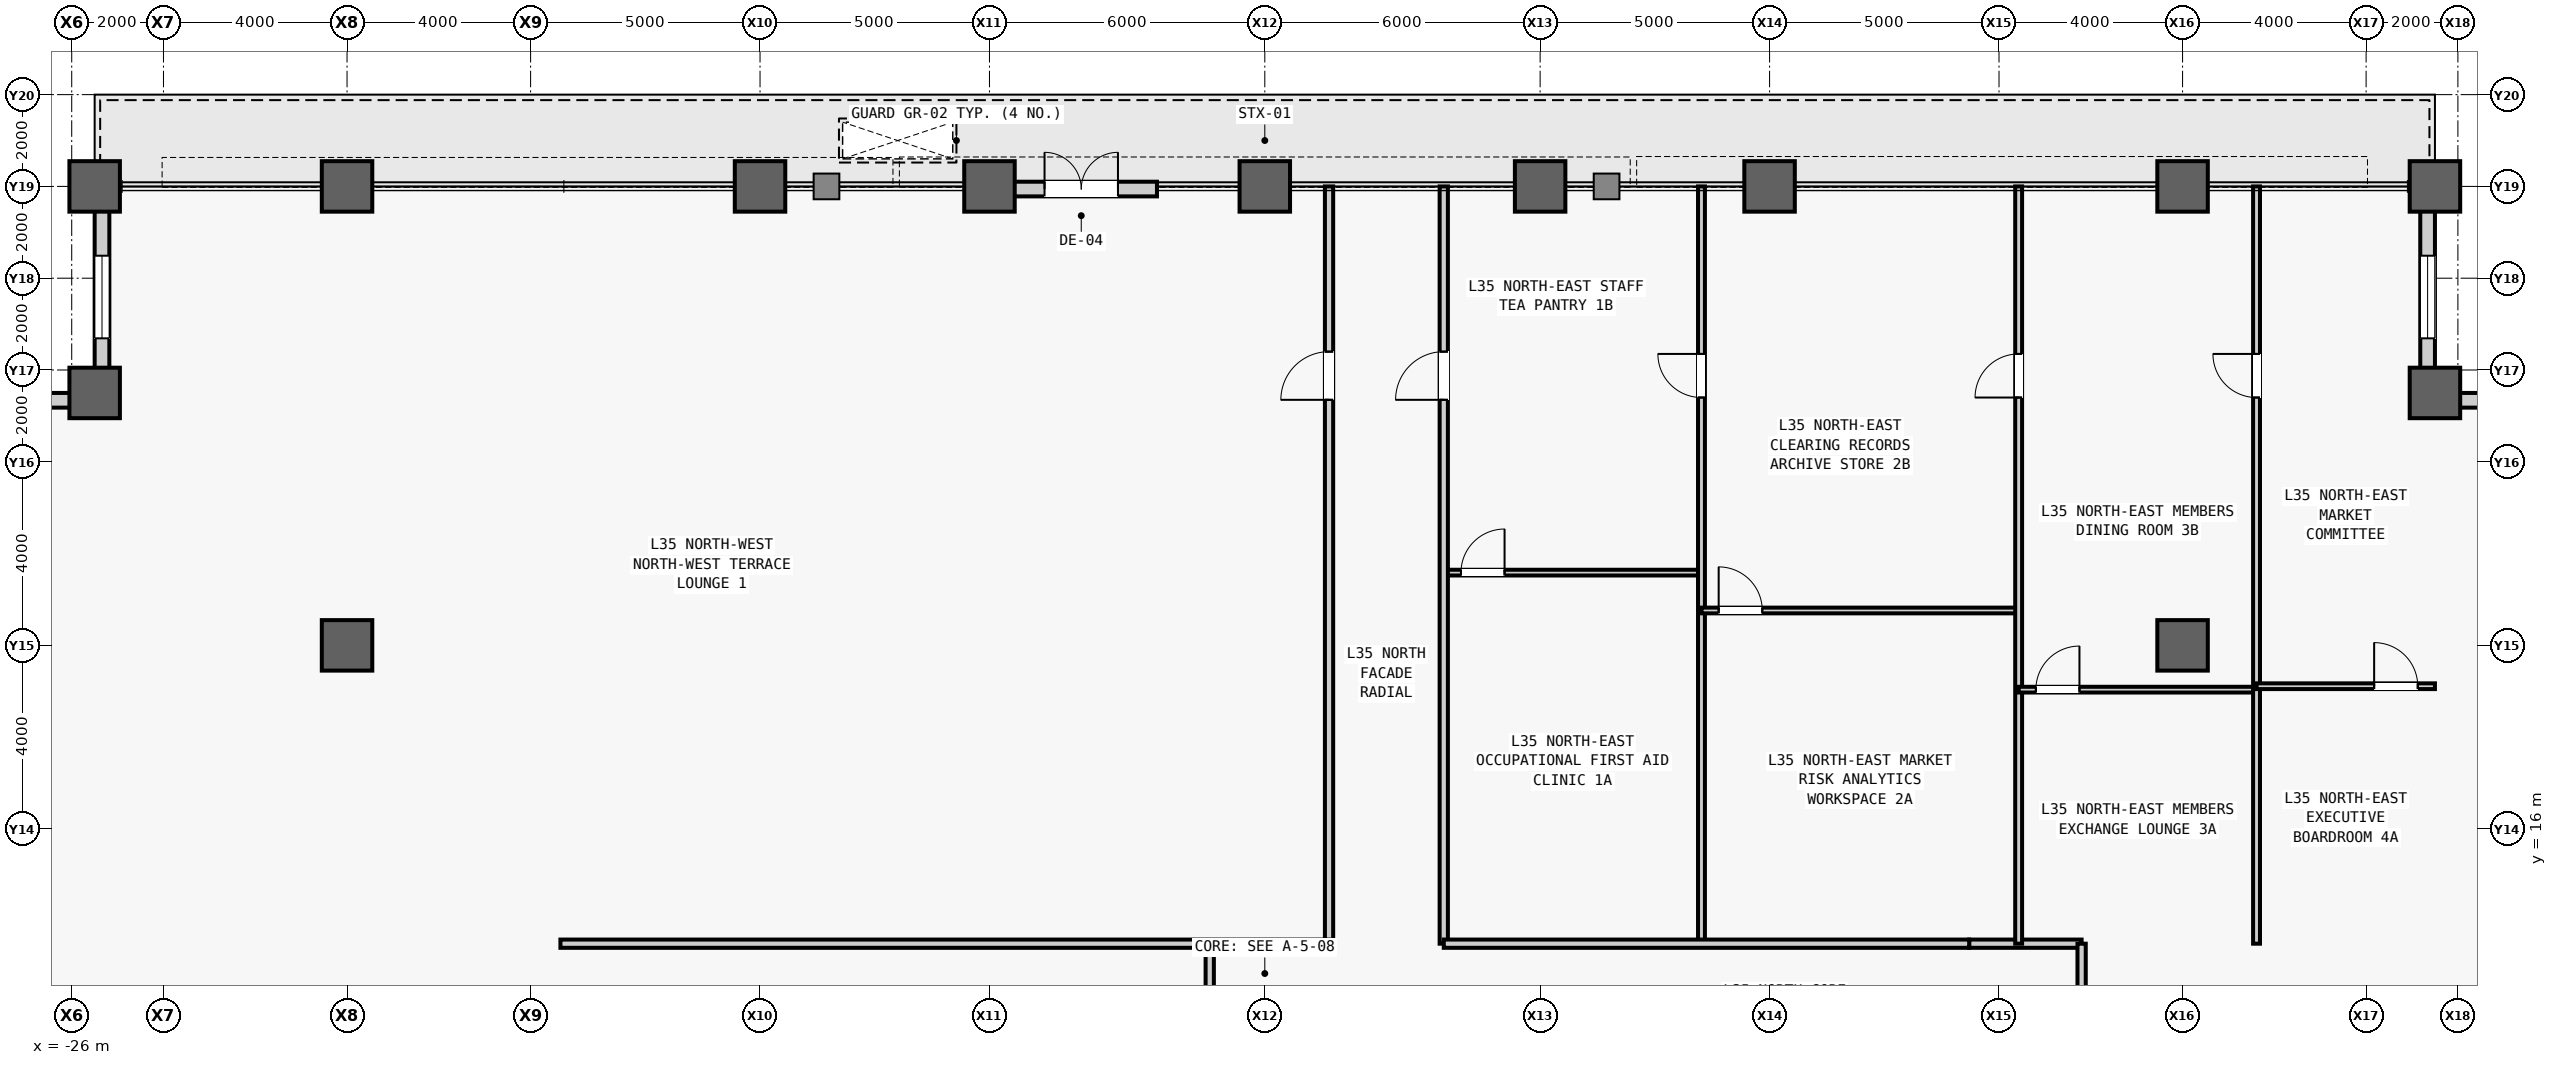
"""IFC4 building model, lengths in metres.
Left out: names, types, materials, properties, quantities, classifications, styles, units other than length and angle.
Written with IfcOpenShell. Run it as: python <this file> out.ifc"""

import sys

from ifc_helpers import new_model, si_unit, direction, frame, frame_2d, origin, origin_2d, place, context, subcontext, project, spatial, rectangle, hollow_rectangle, extrude, source, transform, mapped, element, fill, save


model = new_model("IFC4")
c1 = context("Model", 3, precision=1e-05, world=origin(), true_north=direction((0.0, 1.0)))
c2 = subcontext(c1, "Body", "Model", "MODEL_VIEW")
j1 = project(units=[si_unit("LENGTHUNIT", "METRE"), si_unit("PLANEANGLEUNIT", "RADIAN")], contexts=[c1])
p1 = place(None, origin())
s1 = spatial("IfcSite", under=j1, at=p1, CompositionType="ELEMENT")
p2 = place(p1, origin())
s2 = spatial("IfcBuilding", under=s1, at=p2, CompositionType="ELEMENT")
p3 = place(p2, frame((0.0, 0.0, 155.1)))
s3 = spatial("IfcBuildingStorey", under=s2, at=p3, CompositionType="ELEMENT", Elevation=155.1)
m1 = source(origin(), c2, "Body", "SweptSolid", [
    extrude(hollow_rectangle(XDim=1.1, YDim=1.1, WallThickness=0.06, at=origin_2d()), origin(), (0.0, 0.0, 1.0), 4.0),
])
for number, where, z_axis, x_axis in (
    (1, (-25.5, 25.5, 0.0), (0.0, 0.0, 1.0), (1.0, 0.0, 0.0)),
    (2, (-25.5, 30.0, 0.0), (0.0, 0.0, 1.0), (1.0, 0.0, 0.0)),
    (3, (-20.0, 20.0, 0.0), (0.0, 0.0, 1.0), (1.0, 0.0, 0.0)),
    (4, (-20.0, 30.0, 0.0), (0.0, 0.0, 1.0), (1.0, 0.0, 0.0)),
    (5, (-11.0, 30.0, 0.0), (0.0, 0.0, 1.0), (1.0, 0.0, 0.0)),
    (6, (-6.0, 30.0, 0.0), (0.0, 0.0, 1.0), (1.0, 0.0, 0.0)),
    (7, (0.0, 30.0, 0.0), (0.0, 0.0, 1.0), (1.0, 0.0, 0.0)),
    (8, (6.0, 30.0, 0.0), (0.0, 0.0, 1.0), (1.0, 0.0, 0.0)),
    (9, (11.0, 30.0, 0.0), (0.0, 0.0, 1.0), (1.0, 0.0, 0.0)),
    (10, (20.0, 20.0, 0.0), (0.0, 0.0, 1.0), (1.0, 0.0, 0.0)),
    (11, (20.0, 30.0, 0.0), (0.0, 0.0, 1.0), (1.0, 0.0, 0.0)),
    (12, (25.5, 25.5, 0.0), (0.0, 0.0, 1.0), (1.0, 0.0, 0.0)),
    (13, (25.5, 30.0, 0.0), (0.0, 0.0, 1.0), (1.0, 0.0, 0.0)),
):
    element("IfcColumn", number, at=place(p3, frame(where, z_axis=z_axis, x_axis=x_axis)), inside=s3, PredefinedType="COLUMN", context=c2, shape_type="MappedRepresentation", body=[
        mapped(m1, transform((0.0, 0.0, 0.0), scale=1.0)),
    ])
m2 = source(origin(), c2, "Body", "SweptSolid", [
    extrude(rectangle(XDim=4.18, YDim=0.32, at=frame_2d((2.09, 0.0))), origin(), (0.0, 0.0, 1.0), 3.164),
])
p4 = place(p3, frame((25.5, 25.34, 0.0), z_axis=(0.0, 0.0, 1.0), x_axis=(1.0, 0.0, 0.0)))
e14 = element("IfcWall", 14, at=p4, inside=s3, PredefinedType="STANDARD", context=c2, shape_type="MappedRepresentation", body=[
    mapped(m2, transform((0.0, 0.0, 0.0), scale=1.0)),
])
m3 = source(origin(), c2, "Body", "SweptSolid", [
    extrude(rectangle(XDim=1.8, YDim=2.4, at=frame_2d((0.9, 1.2))), frame((0.0, 0.17, 0.0), z_axis=(0.0, -1.0, 0.0), x_axis=(1.0, 0.0, 0.0)), (0.0, 0.0, 1.0), 0.34),
])
p5 = place(p4, frame((1.19, 0.0, 0.5)))
e15 = element("IfcOpeningElement", 15, at=p5, cuts=e14, PredefinedType="OPENING", context=c2, shape_type="MappedRepresentation", body=[
    mapped(m3, transform((0.0, 0.0, 0.0), scale=1.0)),
])
p6 = place(p3, frame((25.34, 25.5, 0.0), z_axis=(0.0, 0.0, 1.0), x_axis=(0.0, 1.0, 0.0)))
e16 = element("IfcWall", 16, at=p6, inside=s3, PredefinedType="STANDARD", context=c2, shape_type="MappedRepresentation", body=[
    mapped(m2, transform((0.0, 0.0, 0.0), scale=1.0)),
])
p7 = place(p6, frame((1.19, 0.0, 0.5)))
e17 = element("IfcOpeningElement", 17, at=p7, cuts=e16, PredefinedType="OPENING", context=c2, shape_type="MappedRepresentation", body=[
    mapped(m3, transform((0.0, 0.0, 0.0), scale=1.0)),
])
p8 = place(p3, frame((-25.34, 25.5, 0.0), z_axis=(0.0, 0.0, 1.0), x_axis=(0.0, 1.0, 0.0)))
e18 = element("IfcWall", 18, at=p8, inside=s3, PredefinedType="STANDARD", context=c2, shape_type="MappedRepresentation", body=[
    mapped(m2, transform((0.0, 0.0, 0.0), scale=1.0)),
])
p9 = place(p8, frame((1.19, 0.0, 0.5)))
e19 = element("IfcOpeningElement", 19, at=p9, cuts=e18, PredefinedType="OPENING", context=c2, shape_type="MappedRepresentation", body=[
    mapped(m3, transform((0.0, 0.0, 0.0), scale=1.0)),
])
p10 = place(p3, frame((-25.5, 25.34, 0.0), z_axis=(0.0, 0.0, 1.0), x_axis=(-1.0, 0.0, 0.0)))
e20 = element("IfcWall", 20, at=p10, inside=s3, PredefinedType="STANDARD", context=c2, shape_type="MappedRepresentation", body=[
    mapped(m2, transform((0.0, 0.0, 0.0), scale=1.0)),
])
p11 = place(p10, frame((1.19, 0.0, 0.5)))
e21 = element("IfcOpeningElement", 21, at=p11, cuts=e20, PredefinedType="OPENING", context=c2, shape_type="MappedRepresentation", body=[
    mapped(m3, transform((0.0, 0.0, 0.0), scale=1.0)),
])
m4 = source(origin(), c2, "Body", "SweptSolid", [
    extrude(rectangle(XDim=3.3, YDim=0.32, at=frame_2d((1.65, 0.0))), origin(), (0.0, 0.0, 1.0), 3.164),
])
p12 = place(p3, frame((-5.65, 29.942, 0.0), z_axis=(0.0, 0.0, 1.0), x_axis=(1.0, 0.0, 0.0)))
e22 = element("IfcWall", 22, at=p12, inside=s3, PredefinedType="STANDARD", context=c2, shape_type="MappedRepresentation", body=[
    mapped(m4, transform((0.0, 0.0, 0.0), scale=1.0)),
])
m5 = source(origin(), c2, "Body", "SweptSolid", [
    extrude(rectangle(XDim=1.6, YDim=2.25, at=frame_2d((0.8, 1.125))), frame((0.0, 0.17, 0.0), z_axis=(0.0, -1.0, 0.0), x_axis=(1.0, 0.0, 0.0)), (0.0, 0.0, 1.0), 0.34),
])
p13 = place(p12, frame((0.85, 0.0, 0.0)))
e23 = element("IfcOpeningElement", 23, at=p13, cuts=e22, PredefinedType="OPENING", context=c2, shape_type="MappedRepresentation", body=[
    mapped(m5, transform((0.0, 0.0, 0.0), scale=1.0)),
])
m6 = source(origin(), c2, "Body", "SweptSolid", [
    extrude(rectangle(XDim=2.45, YDim=0.18, at=frame_2d((1.225, 0.0))), origin(), (0.0, 0.0, 1.0), 3.78),
])
p14 = place(p3, frame((15.35, 13.5, 0.0), z_axis=(0.0, 0.0, 1.0), x_axis=(1.0, 0.0, 0.0)))
e24 = element("IfcWall", 24, at=p14, inside=s3, PredefinedType="PARTITIONING", context=c2, shape_type="MappedRepresentation", body=[
    mapped(m6, transform((0.0, 0.0, 0.0), scale=1.0)),
])
m7 = source(origin(), c2, "Body", "SweptSolid", [
    extrude(rectangle(XDim=2.5, YDim=0.18, at=frame_2d((1.25, 0.0))), origin(), (0.0, 0.0, 1.0), 3.78),
])
p15 = place(p3, frame((-1.2, 11.0, 0.0), z_axis=(0.0, 0.0, 1.0), x_axis=(0.0, 1.0, 0.0)))
e25 = element("IfcWall", 25, at=p15, inside=s3, PredefinedType="PARTITIONING", context=c2, shape_type="MappedRepresentation", body=[
    mapped(m7, transform((0.0, 0.0, 0.0), scale=1.0)),
])
m8 = source(origin(), c2, "Body", "SweptSolid", [
    extrude(rectangle(XDim=16.5, YDim=0.18, at=frame_2d((8.25, 0.0))), origin(), (0.0, 0.0, 1.0), 3.78),
])
p16 = place(p3, frame((1.4, 13.5, 0.0), z_axis=(0.0, 0.0, 1.0), x_axis=(0.0, 1.0, 0.0)))
e26 = element("IfcWall", 26, at=p16, inside=s3, PredefinedType="PARTITIONING", context=c2, shape_type="MappedRepresentation", body=[
    mapped(m8, transform((0.0, 0.0, 0.0), scale=1.0)),
])
m9 = source(origin(), c2, "Body", "SweptSolid", [
    extrude(rectangle(XDim=1.05, YDim=2.2, at=frame_2d((0.525, 1.1))), frame((0.0, 0.1, 0.0), z_axis=(0.0, -1.0, 0.0), x_axis=(1.0, 0.0, 0.0)), (0.0, 0.0, 1.0), 0.2),
])
p17 = place(p16, frame((11.85, 0.0, 0.0)))
e27 = element("IfcOpeningElement", 27, at=p17, cuts=e26, PredefinedType="OPENING", context=c2, shape_type="MappedRepresentation", body=[
    mapped(m9, transform((0.0, 0.0, 0.0), scale=1.0)),
])
m10 = source(origin(), c2, "Body", "SweptSolid", [
    extrude(rectangle(XDim=16.75, YDim=0.18, at=frame_2d((8.375, 0.0))), origin(), (0.0, 0.0, 1.0), 3.78),
])
p18 = place(p3, frame((-15.35, 13.5, 0.0), z_axis=(0.0, 0.0, 1.0), x_axis=(1.0, 0.0, 0.0)))
e28 = element("IfcWall", 28, at=p18, inside=s3, PredefinedType="PARTITIONING", context=c2, shape_type="MappedRepresentation", body=[
    mapped(m10, transform((0.0, 0.0, 0.0), scale=1.0)),
])
m11 = source(origin(), c2, "Body", "SweptSolid", [
    extrude(rectangle(XDim=5.616, YDim=0.125, at=frame_2d((2.808, 0.0))), origin(), (0.0, 0.0, 1.0), 3.78),
])
p19 = place(p3, frame((3.9, 21.585, 0.0), z_axis=(0.0, 0.0, 1.0), x_axis=(1.0, 0.0, 0.0)))
e29 = element("IfcWall", 29, at=p19, inside=s3, PredefinedType="PARTITIONING", context=c2, shape_type="MappedRepresentation", body=[
    mapped(m11, transform((0.0, 0.0, 0.0), scale=1.0)),
])
m12 = source(origin(), c2, "Body", "SweptSolid", [
    extrude(rectangle(XDim=0.95, YDim=2.15, at=frame_2d((0.475, 1.075))), frame((0.0, 0.073, 0.0), z_axis=(0.0, -1.0, 0.0), x_axis=(1.0, 0.0, 0.0)), (0.0, 0.0, 1.0), 0.145),
])
p20 = place(p19, frame((0.375, 0.0, 0.0)))
e30 = element("IfcOpeningElement", 30, at=p20, cuts=e29, PredefinedType="OPENING", context=c2, shape_type="MappedRepresentation", body=[
    mapped(m12, transform((0.0, 0.0, 0.0), scale=1.0)),
])
m13 = source(origin(), c2, "Body", "SweptSolid", [
    extrude(rectangle(XDim=16.5, YDim=0.15, at=frame_2d((8.25, 0.0))), origin(), (0.0, 0.0, 1.0), 3.78),
])
p21 = place(p3, frame((9.516, 13.5, 0.0), z_axis=(0.0, 0.0, 1.0), x_axis=(0.0, 1.0, 0.0)))
e31 = element("IfcWall", 31, at=p21, inside=s3, PredefinedType="PARTITIONING", context=c2, shape_type="MappedRepresentation", body=[
    mapped(m13, transform((0.0, 0.0, 0.0), scale=1.0)),
])
m14 = source(origin(), c2, "Body", "SweptSolid", [
    extrude(rectangle(XDim=0.95, YDim=2.15, at=frame_2d((0.475, 1.075))), frame((0.0, 0.085, 0.0), z_axis=(0.0, -1.0, 0.0), x_axis=(1.0, 0.0, 0.0)), (0.0, 0.0, 1.0), 0.17),
])
p22 = place(p21, frame((11.9, 0.0, 0.0)))
e32 = element("IfcOpeningElement", 32, at=p22, cuts=e31, PredefinedType="OPENING", context=c2, shape_type="MappedRepresentation", body=[
    mapped(m14, transform((0.0, 0.0, 0.0), scale=1.0)),
])
m15 = source(origin(), c2, "Body", "SweptSolid", [
    extrude(rectangle(XDim=6.912, YDim=0.125, at=frame_2d((3.456, 0.0))), origin(), (0.0, 0.0, 1.0), 3.78),
])
p23 = place(p3, frame((9.516, 20.76, 0.0), z_axis=(0.0, 0.0, 1.0), x_axis=(1.0, 0.0, 0.0)))
e33 = element("IfcWall", 33, at=p23, inside=s3, PredefinedType="PARTITIONING", context=c2, shape_type="MappedRepresentation", body=[
    mapped(m15, transform((0.0, 0.0, 0.0), scale=1.0)),
])
p24 = place(p23, frame((0.375, 0.0, 0.0)))
e34 = element("IfcOpeningElement", 34, at=p24, cuts=e33, PredefinedType="OPENING", context=c2, shape_type="MappedRepresentation", body=[
    mapped(m12, transform((0.0, 0.0, 0.0), scale=1.0)),
])
p25 = place(p3, frame((16.428, 13.5, 0.0), z_axis=(0.0, 0.0, 1.0), x_axis=(0.0, 1.0, 0.0)))
e35 = element("IfcWall", 35, at=p25, inside=s3, PredefinedType="PARTITIONING", context=c2, shape_type="MappedRepresentation", body=[
    mapped(m13, transform((0.0, 0.0, 0.0), scale=1.0)),
])
p26 = place(p25, frame((11.9, 0.0, 0.0)))
e36 = element("IfcOpeningElement", 36, at=p26, cuts=e35, PredefinedType="OPENING", context=c2, shape_type="MappedRepresentation", body=[
    mapped(m14, transform((0.0, 0.0, 0.0), scale=1.0)),
])
m16 = source(origin(), c2, "Body", "SweptSolid", [
    extrude(rectangle(XDim=5.184, YDim=0.125, at=frame_2d((2.592, 0.0))), origin(), (0.0, 0.0, 1.0), 3.78),
])
p27 = place(p3, frame((16.428, 19.035, 0.0), z_axis=(0.0, 0.0, 1.0), x_axis=(1.0, 0.0, 0.0)))
e37 = element("IfcWall", 37, at=p27, inside=s3, PredefinedType="PARTITIONING", context=c2, shape_type="MappedRepresentation", body=[
    mapped(m16, transform((0.0, 0.0, 0.0), scale=1.0)),
])
p28 = place(p27, frame((0.375, 0.0, 0.0)))
e38 = element("IfcOpeningElement", 38, at=p28, cuts=e37, PredefinedType="OPENING", context=c2, shape_type="MappedRepresentation", body=[
    mapped(m12, transform((0.0, 0.0, 0.0), scale=1.0)),
])
p29 = place(p3, frame((21.612, 13.5, 0.0), z_axis=(0.0, 0.0, 1.0), x_axis=(0.0, 1.0, 0.0)))
e39 = element("IfcWall", 39, at=p29, inside=s3, PredefinedType="PARTITIONING", context=c2, shape_type="MappedRepresentation", body=[
    mapped(m13, transform((0.0, 0.0, 0.0), scale=1.0)),
])
p30 = place(p29, frame((11.9, 0.0, 0.0)))
e40 = element("IfcOpeningElement", 40, at=p30, cuts=e39, PredefinedType="OPENING", context=c2, shape_type="MappedRepresentation", body=[
    mapped(m14, transform((0.0, 0.0, 0.0), scale=1.0)),
])
m17 = source(origin(), c2, "Body", "SweptSolid", [
    extrude(rectangle(XDim=3.888, YDim=0.125, at=frame_2d((1.944, 0.0))), origin(), (0.0, 0.0, 1.0), 3.78),
])
p31 = place(p3, frame((21.612, 19.11, 0.0), z_axis=(0.0, 0.0, 1.0), x_axis=(1.0, 0.0, 0.0)))
e41 = element("IfcWall", 41, at=p31, inside=s3, PredefinedType="PARTITIONING", context=c2, shape_type="MappedRepresentation", body=[
    mapped(m17, transform((0.0, 0.0, 0.0), scale=1.0)),
])
p32 = place(p31, frame((2.563, 0.0, 0.0)))
e42 = element("IfcOpeningElement", 42, at=p32, cuts=e41, PredefinedType="OPENING", context=c2, shape_type="MappedRepresentation", body=[
    mapped(m12, transform((0.0, 0.0, 0.0), scale=1.0)),
])
p33 = place(p3, frame((3.9, 13.5, 0.0), z_axis=(0.0, 0.0, 1.0), x_axis=(0.0, 1.0, 0.0)))
e43 = element("IfcWall", 43, at=p33, inside=s3, PredefinedType="PARTITIONING", context=c2, shape_type="MappedRepresentation", body=[
    mapped(m8, transform((0.0, 0.0, 0.0), scale=1.0)),
])
p34 = place(p33, frame((11.85, 0.0, 0.0)))
e44 = element("IfcOpeningElement", 44, at=p34, cuts=e43, PredefinedType="OPENING", context=c2, shape_type="MappedRepresentation", body=[
    mapped(m9, transform((0.0, 0.0, 0.0), scale=1.0)),
])
m18 = source(origin(), c2, "Body", "SweptSolid", [
    extrude(rectangle(XDim=11.45, YDim=0.18, at=frame_2d((5.725, 0.0))), origin(), (0.0, 0.0, 1.0), 3.78),
])
p35 = place(p3, frame((3.9, 13.5, 0.0), z_axis=(0.0, 0.0, 1.0), x_axis=(1.0, 0.0, 0.0)))
e45 = element("IfcWall", 45, at=p35, inside=s3, PredefinedType="PARTITIONING", context=c2, shape_type="MappedRepresentation", body=[
    mapped(m18, transform((0.0, 0.0, 0.0), scale=1.0)),
])
p36 = place(p3, frame((17.8, -3.25, 0.0), z_axis=(0.0, 0.0, 1.0), x_axis=(0.0, 1.0, 0.0)))
e46 = element("IfcWall", 46, at=p36, inside=s3, PredefinedType="PARTITIONING", context=c2, shape_type="MappedRepresentation", body=[
    mapped(m10, transform((0.0, 0.0, 0.0), scale=1.0)),
])
m19 = source(origin(), c2, "Body", "SweptSolid", [
    extrude(rectangle(XDim=1.8, YDim=2.4, at=frame_2d((0.9, 1.2))), frame((0.0, 0.03, 0.0), z_axis=(0.0, -1.0, 0.0), x_axis=(1.0, 0.0, 0.0)), (0.0, 0.0, 1.0), 0.06),
])
p37 = place(p7, origin())
e47 = element("IfcWindow", 47, at=p37, inside=s3, PartitioningType="SINGLE_PANEL", PredefinedType="WINDOW", context=c2, shape_type="MappedRepresentation", body=[
    mapped(m19, transform((0.0, 0.0, 0.0), scale=1.0)),
])
fill(e17, e47)
p38 = place(p9, origin())
e48 = element("IfcWindow", 48, at=p38, inside=s3, PartitioningType="SINGLE_PANEL", PredefinedType="WINDOW", context=c2, shape_type="MappedRepresentation", body=[
    mapped(m19, transform((0.0, 0.0, 0.0), scale=1.0)),
])
fill(e19, e48)
m20 = source(origin(), c2, "Body", "SweptSolid", [
    extrude(rectangle(XDim=1.6, YDim=2.25, at=frame_2d((0.8, 1.125))), frame((0.0, 0.025, 0.0), z_axis=(0.0, -1.0, 0.0), x_axis=(1.0, 0.0, 0.0)), (0.0, 0.0, 1.0), 0.05),
])
p39 = place(p13, origin())
e49 = element("IfcDoor", 49, at=p39, inside=s3, OperationType="DOUBLE_DOOR_SINGLE_SWING", PredefinedType="DOOR", context=c2, shape_type="MappedRepresentation", body=[
    mapped(m20, transform((0.0, 0.0, 0.0), scale=1.0)),
])
fill(e23, e49)
m21 = source(origin(), c2, "Body", "SweptSolid", [
    extrude(rectangle(XDim=1.05, YDim=2.2, at=frame_2d((0.525, 1.1))), frame((0.0, 0.025, 0.0), z_axis=(0.0, -1.0, 0.0), x_axis=(1.0, 0.0, 0.0)), (0.0, 0.0, 1.0), 0.05),
])
p40 = place(p17, origin())
e50 = element("IfcDoor", 50, at=p40, inside=s3, OperationType="SINGLE_SWING_LEFT", PredefinedType="DOOR", context=c2, shape_type="MappedRepresentation", body=[
    mapped(m21, transform((0.0, 0.0, 0.0), scale=1.0)),
])
fill(e27, e50)
m22 = source(origin(), c2, "Body", "SweptSolid", [
    extrude(rectangle(XDim=0.95, YDim=2.15, at=frame_2d((0.475, 1.075))), frame((0.0, 0.025, 0.0), z_axis=(0.0, -1.0, 0.0), x_axis=(1.0, 0.0, 0.0)), (0.0, 0.0, 1.0), 0.05),
])
p41 = place(p20, origin())
e51 = element("IfcDoor", 51, at=p41, inside=s3, OperationType="SINGLE_SWING_RIGHT", PredefinedType="DOOR", context=c2, shape_type="MappedRepresentation", body=[
    mapped(m22, transform((0.0, 0.0, 0.0), scale=1.0)),
])
fill(e30, e51)
p42 = place(p22, origin())
e52 = element("IfcDoor", 52, at=p42, inside=s3, OperationType="SINGLE_SWING_RIGHT", PredefinedType="DOOR", context=c2, shape_type="MappedRepresentation", body=[
    mapped(m22, transform((0.0, 0.0, 0.0), scale=1.0)),
])
fill(e32, e52)
p43 = place(p24, origin())
e53 = element("IfcDoor", 53, at=p43, inside=s3, OperationType="SINGLE_SWING_LEFT", PredefinedType="DOOR", context=c2, shape_type="MappedRepresentation", body=[
    mapped(m22, transform((0.0, 0.0, 0.0), scale=1.0)),
])
fill(e34, e53)
p44 = place(p26, origin())
e54 = element("IfcDoor", 54, at=p44, inside=s3, OperationType="SINGLE_SWING_LEFT", PredefinedType="DOOR", context=c2, shape_type="MappedRepresentation", body=[
    mapped(m22, transform((0.0, 0.0, 0.0), scale=1.0)),
])
fill(e36, e54)
p45 = place(p28, origin())
e55 = element("IfcDoor", 55, at=p45, inside=s3, OperationType="SINGLE_SWING_RIGHT", PredefinedType="DOOR", context=c2, shape_type="MappedRepresentation", body=[
    mapped(m22, transform((0.0, 0.0, 0.0), scale=1.0)),
])
fill(e38, e55)
p46 = place(p30, origin())
e56 = element("IfcDoor", 56, at=p46, inside=s3, OperationType="SINGLE_SWING_RIGHT", PredefinedType="DOOR", context=c2, shape_type="MappedRepresentation", body=[
    mapped(m22, transform((0.0, 0.0, 0.0), scale=1.0)),
])
fill(e40, e56)
p47 = place(p32, origin())
e57 = element("IfcDoor", 57, at=p47, inside=s3, OperationType="SINGLE_SWING_LEFT", PredefinedType="DOOR", context=c2, shape_type="MappedRepresentation", body=[
    mapped(m22, transform((0.0, 0.0, 0.0), scale=1.0)),
])
fill(e42, e57)
p48 = place(p34, origin())
e58 = element("IfcDoor", 58, at=p48, inside=s3, OperationType="SINGLE_SWING_LEFT", PredefinedType="DOOR", context=c2, shape_type="MappedRepresentation", body=[
    mapped(m21, transform((0.0, 0.0, 0.0), scale=1.0)),
])
fill(e44, e58)
save(model, sys.argv[1])
